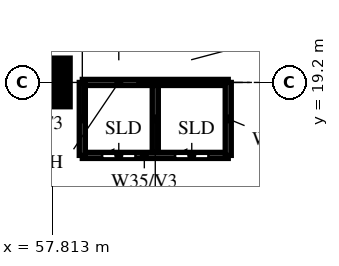
"""IFC4 building model, lengths in metres.
Left out: names, types, materials, properties, quantities, classifications, styles, units other than length and angle.
Written with IfcOpenShell. Run it as: python <this file> out.ifc"""

import sys

from ifc_helpers import new_model, si_unit, direction, frame, frame_2d, origin, origin_2d, place, context, subcontext, project, spatial, rectangle, circle, extrude, source, transform, mapped, element, fill, save


model = new_model("IFC4")
c1 = context("Model", 3, precision=1e-05, world=origin(), true_north=direction((0.0, 1.0)))
c2 = subcontext(c1, "Body", "Model", "MODEL_VIEW")
j1 = project(units=[si_unit("LENGTHUNIT", "METRE"), si_unit("PLANEANGLEUNIT", "RADIAN")], contexts=[c1])
p1 = place(None, origin())
s1 = spatial("IfcSite", under=j1, at=p1, CompositionType="ELEMENT")
p2 = place(p1, origin())
s2 = spatial("IfcBuilding", under=s1, at=p2, CompositionType="ELEMENT")
p3 = place(p2, origin())
s3 = spatial("IfcBuildingStorey", under=s2, at=p3, CompositionType="ELEMENT", Elevation=0.0)
m1 = source(origin(), c2, "Body", "SweptSolid", [
    extrude(circle(Radius=0.8, at=origin_2d()), origin(), (0.0, 0.0, 1.0), 7.4),
])
p4 = place(p3, frame((57.6, 19.2, 0.0), z_axis=(0.0, 0.0, 1.0), x_axis=(1.0, 0.0, 0.0)))
e1 = element("IfcColumn", 1, at=p4, inside=s3, PredefinedType="COLUMN", context=c2, shape_type="MappedRepresentation", body=[
    mapped(m1, transform((0.0, 0.0, 0.0))),
])
p5 = place(p3, frame((58.8, 16.8, 0.0), z_axis=(0.0, 0.0, 1.0), x_axis=(1.0, 0.0, 0.0)))
e2 = element("IfcWall", 2, at=p5, inside=s3, PredefinedType="SOLIDWALL", context=c2, shape_type="SweptSolid", body=[
    extrude(rectangle(XDim=4.8, YDim=0.2, at=frame_2d((2.4, 0.0))), origin(), (0.0, 0.0, 1.0), 7.4),
])
p6 = place(p5, frame((0.65, 0.0, 0.0)))
e3 = element("IfcOpeningElement", 3, at=p6, cuts=e2, PredefinedType="OPENING", context=c2, shape_type="SweptSolid", body=[
    extrude(rectangle(XDim=1.1, YDim=2.1, at=frame_2d((0.55, 1.05))), frame((0.0, 0.11, 0.0), z_axis=(0.0, -1.0, 0.0), x_axis=(1.0, 0.0, 0.0)), (0.0, 0.0, 1.0), 0.22),
])
p7 = place(p5, frame((3.05, 0.0, 0.0)))
e4 = element("IfcOpeningElement", 4, at=p7, cuts=e2, PredefinedType="OPENING", context=c2, shape_type="SweptSolid", body=[
    extrude(rectangle(XDim=1.1, YDim=2.1, at=frame_2d((0.55, 1.05))), frame((0.0, 0.11, 0.0), z_axis=(0.0, -1.0, 0.0), x_axis=(1.0, 0.0, 0.0)), (0.0, 0.0, 1.0), 0.22),
])
p8 = place(p3, frame((58.8, 19.2, 0.0), z_axis=(0.0, 0.0, 1.0), x_axis=(1.0, 0.0, 0.0)))
e5 = element("IfcWall", 5, at=p8, inside=s3, PredefinedType="SOLIDWALL", context=c2, shape_type="SweptSolid", body=[
    extrude(rectangle(XDim=4.8, YDim=0.2, at=frame_2d((2.4, 0.0))), origin(), (0.0, 0.0, 1.0), 7.4),
])
p9 = place(p3, frame((58.8, 16.8, 0.0), z_axis=(0.0, 0.0, 1.0), x_axis=(0.0, 1.0, 0.0)))
e6 = element("IfcWall", 6, at=p9, inside=s3, PredefinedType="SOLIDWALL", context=c2, shape_type="SweptSolid", body=[
    extrude(rectangle(XDim=2.4, YDim=0.2, at=frame_2d((1.2, 0.0))), origin(), (0.0, 0.0, 1.0), 7.4),
])
p10 = place(p3, frame((61.2, 16.9, 0.0), z_axis=(0.0, 0.0, 1.0), x_axis=(0.0, 1.0, 0.0)))
e7 = element("IfcWall", 7, at=p10, inside=s3, PredefinedType="SOLIDWALL", context=c2, shape_type="SweptSolid", body=[
    extrude(rectangle(XDim=2.2, YDim=0.2, at=frame_2d((1.1, 0.0))), origin(), (0.0, 0.0, 1.0), 7.4),
])
p11 = place(p3, frame((63.6, 16.8, 0.0), z_axis=(0.0, 0.0, 1.0), x_axis=(0.0, 1.0, 0.0)))
e8 = element("IfcWall", 8, at=p11, inside=s3, PredefinedType="SOLIDWALL", context=c2, shape_type="SweptSolid", body=[
    extrude(rectangle(XDim=2.4, YDim=0.2, at=frame_2d((1.2, 0.0))), origin(), (0.0, 0.0, 1.0), 7.4),
])
p12 = place(p6, origin())
e9 = element("IfcDoor", 9, at=p12, inside=s3, OperationType="SLIDING_TO_LEFT", PredefinedType="DOOR", context=c2, shape_type="SweptSolid", body=[
    extrude(rectangle(XDim=1.1, YDim=2.1, at=frame_2d((0.55, 1.05))), frame((0.0, 0.025, 0.0), z_axis=(0.0, -1.0, 0.0), x_axis=(1.0, 0.0, 0.0)), (0.0, 0.0, 1.0), 0.05),
])
fill(e3, e9)
p13 = place(p7, origin())
e10 = element("IfcDoor", 10, at=p13, inside=s3, OperationType="SLIDING_TO_LEFT", PredefinedType="DOOR", context=c2, shape_type="SweptSolid", body=[
    extrude(rectangle(XDim=1.1, YDim=2.1, at=frame_2d((0.55, 1.05))), frame((0.0, 0.025, 0.0), z_axis=(0.0, -1.0, 0.0), x_axis=(1.0, 0.0, 0.0)), (0.0, 0.0, 1.0), 0.05),
])
fill(e4, e10)
save(model, sys.argv[1])
